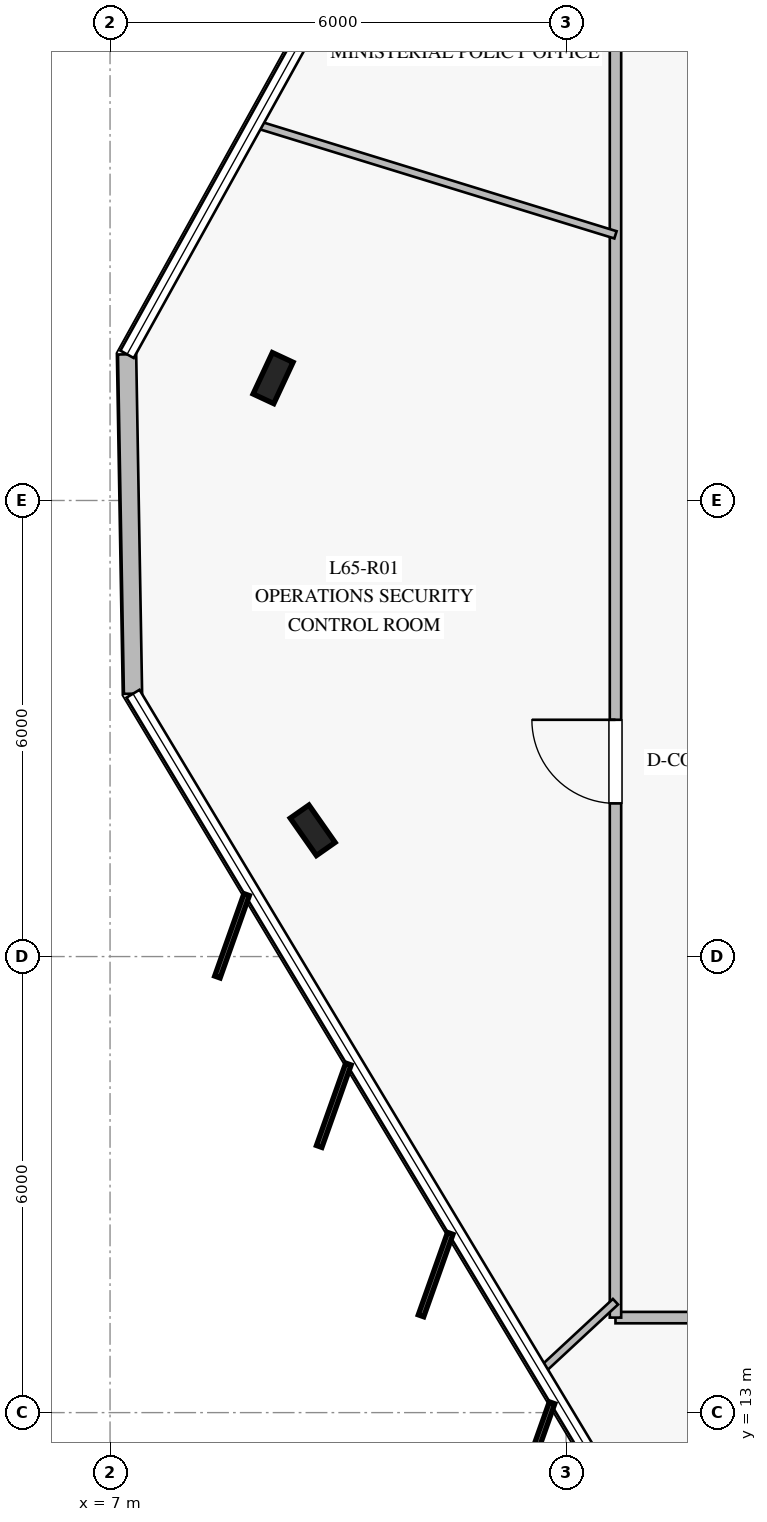
"""IFC4 building model, lengths in metres.
Left out: names, types, materials, properties, quantities, classifications, styles, units other than length and angle.
Written with IfcOpenShell. Run it as: python <this file> out.ifc"""

import sys

from ifc_helpers import new_model, si_unit, direction, frame, frame_2d, origin, origin_2d, place, context, subcontext, project, spatial, rectangle, i_section, extrude, element, fill, save


model = new_model("IFC4")
c1 = context("Model", 3, precision=1e-05, world=origin(), true_north=direction((0.0, 1.0)))
c2 = subcontext(c1, "Body", "Model", "MODEL_VIEW")
j1 = project(units=[si_unit("LENGTHUNIT", "METRE"), si_unit("PLANEANGLEUNIT", "RADIAN")], contexts=[c1])
p1 = place(None, origin())
s1 = spatial("IfcSite", under=j1, at=p1, CompositionType="ELEMENT")
p2 = place(p1, origin())
s2 = spatial("IfcBuilding", under=s1, at=p2, CompositionType="ELEMENT")
p3 = place(p2, frame((0.0, 0.0, 270.2)))
s3 = spatial("IfcBuildingStorey", under=s2, at=p3, CompositionType="ELEMENT", Elevation=270.2)
for number, where, z_axis, x_axis in (
    (1, (9.145, 26.61, 0.0), (0.0, 0.0, 1.0), (0.423, 0.906, 0.0)),
    (2, (9.666, 20.661, 0.0), (0.0, 0.0, 1.0), (-0.574, 0.819, 0.0)),
):
    element("IfcColumn", number, at=place(p3, frame(where, z_axis=z_axis, x_axis=x_axis)), inside=s3, PredefinedType="COLUMN", context=c2, shape_type="SweptSolid", body=[
        extrude(i_section(OverallWidth=0.3, OverallDepth=0.6, WebThickness=0.015, FlangeThickness=0.03, at=origin_2d()), origin(), (0.0, 0.0, 1.0), 4.0),
    ])
p4 = place(p3, frame((7.224, 26.923, 0.0), z_axis=(0.0, 0.0, 1.0), x_axis=(0.01743952575, -0.999847919907, 0.0)))
e3 = element("IfcWall", 3, at=p4, inside=s3, PredefinedType="STANDARD", context=c2, shape_type="SweptSolid", body=[
    extrude(rectangle(XDim=4.466, YDim=0.24, at=frame_2d((2.233, 0.0))), origin(), (0.0, 0.0, 1.0), 3.78),
])
p5 = place(p3, frame((36.35, 14.25, 0.0), z_axis=(0.0, 0.0, 1.0), x_axis=(-1.0, 0.0, 0.0)))
e4 = element("IfcWall", 4, at=p5, inside=s3, PredefinedType="PARTITIONING", context=c2, shape_type="SweptSolid", body=[
    extrude(rectangle(XDim=22.7, YDim=0.15, at=frame_2d((11.35, 0.0))), origin(), (0.0, 0.0, 1.0), 3.28),
])
p6 = place(p5, frame((15.525, 0.0, 0.0)))
e5 = element("IfcOpeningElement", 5, at=p6, cuts=e4, PredefinedType="OPENING", context=c2, shape_type="SweptSolid", body=[
    extrude(rectangle(XDim=1.1, YDim=2.2, at=frame_2d((0.55, 1.1))), frame((0.0, 0.085, 0.0), z_axis=(0.0, -1.0, 0.0), x_axis=(1.0, 0.0, 0.0)), (0.0, 0.0, 1.0), 0.17),
])
p7 = place(p3, frame((13.65, 14.25, 0.0), z_axis=(0.0, 0.0, 1.0), x_axis=(0.0, 1.0, 0.0)))
e6 = element("IfcWall", 6, at=p7, inside=s3, PredefinedType="PARTITIONING", context=c2, shape_type="SweptSolid", body=[
    extrude(rectangle(XDim=21.5, YDim=0.15, at=frame_2d((10.75, 0.0))), origin(), (0.0, 0.0, 1.0), 3.25),
])
p8 = place(p7, frame((6.765, 0.0, 0.0)))
e7 = element("IfcOpeningElement", 7, at=p8, cuts=e6, PredefinedType="OPENING", context=c2, shape_type="SweptSolid", body=[
    extrude(rectangle(XDim=1.1, YDim=2.2, at=frame_2d((0.55, 1.1))), frame((0.0, 0.085, 0.0), z_axis=(0.0, -1.0, 0.0), x_axis=(1.0, 0.0, 0.0)), (0.0, 0.0, 1.0), 0.17),
])
p9 = place(p3, frame((13.65, 28.495, 0.0), z_axis=(0.0, 0.0, 1.0), x_axis=(-0.955737392595, 0.29422106722, 0.0)))
e8 = element("IfcWall", 8, at=p9, inside=s3, PredefinedType="MOVABLE", context=c2, shape_type="SweptSolid", body=[
    extrude(rectangle(XDim=4.948, YDim=0.1, at=frame_2d((2.474, 0.0))), origin(), (0.0, 0.0, 1.0), 3.28),
])
p10 = place(p3, frame((13.65, 14.459, 0.0), z_axis=(0.0, 0.0, 1.0), x_axis=(-0.732786974923, -0.680458117288, 0.0)))
e9 = element("IfcWall", 9, at=p10, inside=s3, PredefinedType="MOVABLE", context=c2, shape_type="SweptSolid", body=[
    extrude(rectangle(XDim=1.334, YDim=0.1, at=frame_2d((0.667, 0.0))), origin(), (0.0, 0.0, 1.0), 3.28),
])
p11 = place(p8, origin())
e10 = element("IfcDoor", 10, at=p11, inside=s3, OperationType="SINGLE_SWING_RIGHT", PredefinedType="DOOR", context=c2, shape_type="SweptSolid", body=[
    extrude(rectangle(XDim=1.1, YDim=2.2, at=frame_2d((0.55, 1.1))), frame((0.0, 0.025, 0.0), z_axis=(0.0, -1.0, 0.0), x_axis=(1.0, 0.0, 0.0)), (0.0, 0.0, 1.0), 0.05),
])
fill(e7, e10)
save(model, sys.argv[1])
